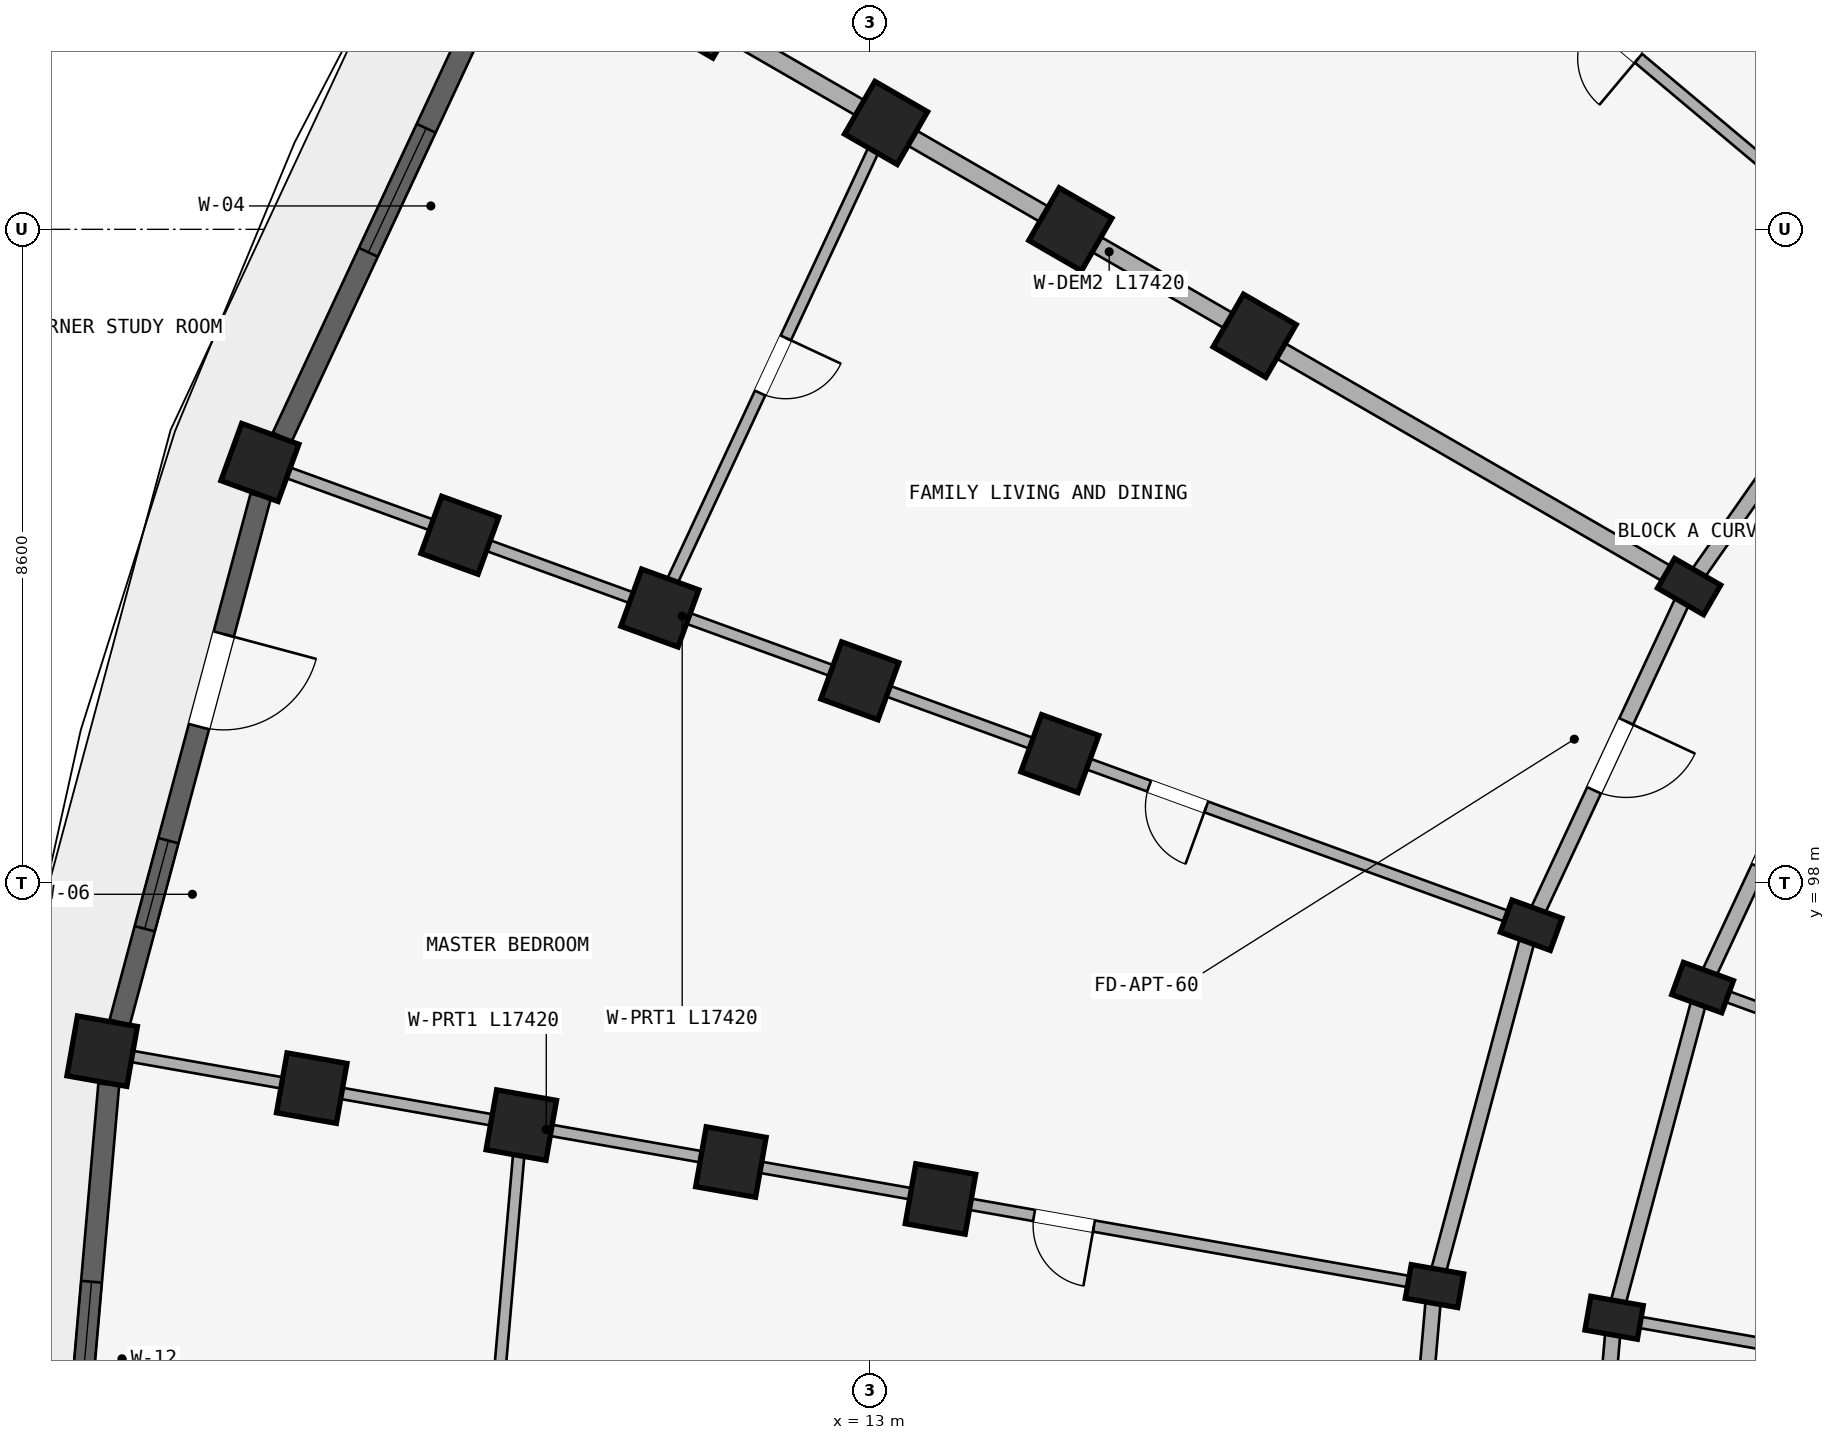
"""IFC4 building model, lengths in metres.
Left out: names, types, materials, properties, quantities, classifications, styles, units other than length and angle.
Written with IfcOpenShell. Run it as: python <this file> out.ifc"""

import sys

from ifc_helpers import new_model, si_unit, direction, frame, frame_2d, origin, origin_2d, place, context, subcontext, project, spatial, rectangle, extrude, element, fill, save


model = new_model("IFC4")
c1 = context("Model", 3, precision=1e-05, world=origin(), true_north=direction((0.0, 1.0)))
c2 = subcontext(c1, "Body", "Model", "MODEL_VIEW")
j1 = project(units=[si_unit("LENGTHUNIT", "METRE"), si_unit("PLANEANGLEUNIT", "RADIAN")], contexts=[c1])
p1 = place(None, origin())
s1 = spatial("IfcSite", under=j1, at=p1, CompositionType="ELEMENT")
p2 = place(p1, origin())
s2 = spatial("IfcBuilding", under=s1, at=p2, CompositionType="ELEMENT")
p3 = place(p2, frame((0.0, 0.0, 11.85)))
s3 = spatial("IfcBuildingStorey", under=s2, at=p3, CompositionType="ELEMENT", Elevation=11.85)
p4 = place(p3, frame((23.778, 101.9, 0.0), z_axis=(0.0, 0.0, 1.0), x_axis=(0.5, 0.866025403784, 0.0)))
e1 = element("IfcColumn", 1, at=p4, inside=s3, PredefinedType="COLUMN", context=c2, shape_type="SweptSolid", body=[
    extrude(rectangle(XDim=0.45, YDim=0.7, at=origin_2d()), origin(), (0.0, 0.0, 1.0), 2.93),
])
for number, where, z_axis, x_axis in (
    (2, (18.062, 105.2, 0.0), (0.0, 0.0, 1.0), (0.5, 0.866, 0.0)),
    (3, (15.637, 106.6, 0.0), (0.0, 0.0, 1.0), (0.5, 0.866, 0.0)),
    (4, (13.213, 108.0, 0.0), (0.0, 0.0, 1.0), (0.5, 0.866, 0.0)),
    (5, (10.788, 109.4, 0.0), (0.0, 0.0, 1.0), (0.5, 0.866, 0.0)),
):
    element("IfcColumn", number, at=place(p3, frame(where, z_axis=z_axis, x_axis=x_axis)), inside=s3, PredefinedType="COLUMN", context=c2, shape_type="SweptSolid", body=[
        extrude(rectangle(XDim=0.8, YDim=0.8, at=origin_2d()), origin(), (0.0, 0.0, 1.0), 2.93),
    ])
for number, where, z_axis, x_axis in (
    (6, (23.956, 96.624, 0.0), (0.0, 0.0, 1.0), (0.342, 0.94, 0.0)),
    (7, (21.701, 97.445, 0.0), (0.0, 0.0, 1.0), (0.342, 0.94, 0.0)),
):
    element("IfcColumn", number, at=place(p3, frame(where, z_axis=z_axis, x_axis=x_axis)), inside=s3, PredefinedType="COLUMN", context=c2, shape_type="SweptSolid", body=[
        extrude(rectangle(XDim=0.45, YDim=0.7, at=origin_2d()), origin(), (0.0, 0.0, 1.0), 2.93),
    ])
for number, where, z_axis, x_axis in (
    (8, (15.499, 99.702, 0.0), (0.0, 0.0, 1.0), (0.342, 0.94, 0.0)),
    (9, (12.868, 100.66, 0.0), (0.0, 0.0, 1.0), (0.342, 0.94, 0.0)),
    (10, (10.236, 101.618, 0.0), (0.0, 0.0, 1.0), (0.342, 0.94, 0.0)),
    (11, (7.605, 102.575, 0.0), (0.0, 0.0, 1.0), (0.342, 0.94, 0.0)),
    (12, (4.974, 103.533, 0.0), (0.0, 0.0, 1.0), (0.342, 0.94, 0.0)),
):
    element("IfcColumn", number, at=place(p3, frame(where, z_axis=z_axis, x_axis=x_axis)), inside=s3, PredefinedType="COLUMN", context=c2, shape_type="SweptSolid", body=[
        extrude(rectangle(XDim=0.8, YDim=0.8, at=origin_2d()), origin(), (0.0, 0.0, 1.0), 2.93),
    ])
for number, where, z_axis, x_axis in (
    (13, (22.792, 92.28, 0.0), (0.0, 0.0, 1.0), (0.174, 0.985, 0.0)),
    (14, (20.428, 92.697, 0.0), (0.0, 0.0, 1.0), (0.174, 0.985, 0.0)),
):
    element("IfcColumn", number, at=place(p3, frame(where, z_axis=z_axis, x_axis=x_axis)), inside=s3, PredefinedType="COLUMN", context=c2, shape_type="SweptSolid", body=[
        extrude(rectangle(XDim=0.45, YDim=0.7, at=origin_2d()), origin(), (0.0, 0.0, 1.0), 2.93),
    ])
for number, where, z_axis, x_axis in (
    (15, (13.929, 93.843, 0.0), (0.0, 0.0, 1.0), (0.174, 0.985, 0.0)),
    (16, (11.171, 94.329, 0.0), (0.0, 0.0, 1.0), (0.174, 0.985, 0.0)),
    (17, (8.414, 94.815, 0.0), (0.0, 0.0, 1.0), (0.174, 0.985, 0.0)),
    (18, (5.656, 95.302, 0.0), (0.0, 0.0, 1.0), (0.174, 0.985, 0.0)),
    (19, (2.899, 95.788, 0.0), (0.0, 0.0, 1.0), (0.174, 0.985, 0.0)),
):
    element("IfcColumn", number, at=place(p3, frame(where, z_axis=z_axis, x_axis=x_axis)), inside=s3, PredefinedType="COLUMN", context=c2, shape_type="SweptSolid", body=[
        extrude(rectangle(XDim=0.8, YDim=0.8, at=origin_2d()), origin(), (0.0, 0.0, 1.0), 2.93),
    ])
p5 = place(p3, frame((26.598, 105.927, 0.0), z_axis=(0.0, 0.0, 1.0), x_axis=(-0.573592335331, -0.819140911474, 0.0)))
e20 = element("IfcWall", 20, at=p5, inside=s3, PredefinedType="STANDARD", context=c2, shape_type="SweptSolid", body=[
    extrude(rectangle(XDim=4.916, YDim=0.2, at=frame_2d((2.458, 0.0))), origin(), (0.0, 0.0, 1.0), 2.372),
])
p6 = place(p3, frame((25.856, 100.7, 0.0), z_axis=(0.0, 0.0, 1.0), x_axis=(-0.422617978463, -0.906307919131, 0.0)))
e21 = element("IfcWall", 21, at=p6, inside=s3, PredefinedType="STANDARD", context=c2, shape_type="SweptSolid", body=[
    extrude(rectangle(XDim=4.497, YDim=0.2, at=frame_2d((2.249, 0.0))), origin(), (0.0, 0.0, 1.0), 2.372),
])
p7 = place(p6, frame((1.749, 0.0, 0.0)))
e22 = element("IfcOpeningElement", 22, at=p7, cuts=e21, PredefinedType="OPENING", context=c2, shape_type="SweptSolid", body=[
    extrude(rectangle(XDim=1.0, YDim=2.15, at=frame_2d((0.5, 1.075))), frame((0.0, 0.11, 0.0), z_axis=(0.0, -1.0, 0.0), x_axis=(1.0, 0.0, 0.0)), (0.0, 0.0, 1.0), 0.22),
])
p8 = place(p3, frame((23.778, 101.9, 0.0), z_axis=(0.0, 0.0, 1.0), x_axis=(-0.422629854778, -0.906302381024, 0.0)))
e23 = element("IfcWall", 23, at=p8, inside=s3, PredefinedType="STANDARD", context=c2, shape_type="SweptSolid", body=[
    extrude(rectangle(XDim=4.915, YDim=0.2, at=frame_2d((2.458, 0.0))), origin(), (0.0, 0.0, 1.0), 2.372),
])
p9 = place(p8, frame((1.958, 0.0, 0.0)))
e24 = element("IfcOpeningElement", 24, at=p9, cuts=e23, PredefinedType="OPENING", context=c2, shape_type="SweptSolid", body=[
    extrude(rectangle(XDim=1.0, YDim=2.15, at=frame_2d((0.5, 1.075))), frame((0.0, 0.11, 0.0), z_axis=(0.0, -1.0, 0.0), x_axis=(1.0, 0.0, 0.0)), (0.0, 0.0, 1.0), 0.22),
])
p10 = place(p3, frame((23.956, 96.624, 0.0), z_axis=(0.0, 0.0, 1.0), x_axis=(-0.258787642463, -0.965934240054, 0.0)))
e25 = element("IfcWall", 25, at=p10, inside=s3, PredefinedType="STANDARD", context=c2, shape_type="SweptSolid", body=[
    extrude(rectangle(XDim=4.497, YDim=0.2, at=frame_2d((2.249, 0.0))), origin(), (0.0, 0.0, 1.0), 2.372),
])
p11 = place(p3, frame((21.701, 97.445, 0.0), z_axis=(0.0, 0.0, 1.0), x_axis=(-0.258803112091, -0.965930095386, 0.0)))
e26 = element("IfcWall", 26, at=p11, inside=s3, PredefinedType="STANDARD", context=c2, shape_type="SweptSolid", body=[
    extrude(rectangle(XDim=4.916, YDim=0.2, at=frame_2d((2.458, 0.0))), origin(), (0.0, 0.0, 1.0), 2.372),
])
p12 = place(p3, frame((22.792, 92.28, 0.0), z_axis=(0.0, 0.0, 1.0), x_axis=(-0.087187153726, -0.996191949488, 0.0)))
e27 = element("IfcWall", 27, at=p12, inside=s3, PredefinedType="STANDARD", context=c2, shape_type="SweptSolid", body=[
    extrude(rectangle(XDim=4.497, YDim=0.2, at=frame_2d((2.249, 0.0))), origin(), (0.0, 0.0, 1.0), 2.372),
])
p13 = place(p3, frame((20.428, 92.697, 0.0), z_axis=(0.0, 0.0, 1.0), x_axis=(-0.087167566415, -0.996193663584, 0.0)))
e28 = element("IfcWall", 28, at=p13, inside=s3, PredefinedType="STANDARD", context=c2, shape_type="SweptSolid", body=[
    extrude(rectangle(XDim=4.916, YDim=0.2, at=frame_2d((2.458, 0.0))), origin(), (0.0, 0.0, 1.0), 2.372),
])
p14 = place(p3, frame((26.521, 105.991, 0.0), z_axis=(0.0, 0.0, 1.0), x_axis=(-0.766046835987, 0.642784757967, 0.0)))
e29 = element("IfcWall", 29, at=p14, inside=s3, PredefinedType="PARTITIONING", context=c2, shape_type="SweptSolid", body=[
    extrude(rectangle(XDim=17.42, YDim=0.15, at=frame_2d((8.71, 0.0))), origin(), (0.0, 0.0, 1.0), 2.372),
])
p15 = place(p14, frame((4.45, 0.0, 0.0)))
e30 = element("IfcOpeningElement", 30, at=p15, cuts=e29, PredefinedType="OPENING", context=c2, shape_type="SweptSolid", body=[
    extrude(rectangle(XDim=0.8, YDim=2.1, at=frame_2d((0.4, 1.05))), frame((0.0, 0.085, 0.0), z_axis=(0.0, -1.0, 0.0), x_axis=(1.0, 0.0, 0.0)), (0.0, 0.0, 1.0), 0.17),
])
p16 = place(p3, frame((23.691, 101.95, 0.0), z_axis=(0.0, 0.0, 1.0), x_axis=(-0.866026648973, 0.499997843263, 0.0)))
e31 = element("IfcWall", 31, at=p16, inside=s3, PredefinedType="STANDARD", context=c2, shape_type="SweptSolid", body=[
    extrude(rectangle(XDim=17.42, YDim=0.23, at=frame_2d((8.71, 0.0))), origin(), (0.0, 0.0, 1.0), 2.372),
])
p17 = place(p3, frame((30.346, 94.298, 0.0), z_axis=(0.0, 0.0, 1.0), x_axis=(-0.939696231917, 0.342010221662, 0.0)))
e32 = element("IfcWall", 32, at=p17, inside=s3, PredefinedType="PARTITIONING", context=c2, shape_type="SweptSolid", body=[
    extrude(rectangle(XDim=6.75, YDim=0.15, at=frame_2d((3.375, 0.0))), origin(), (0.0, 0.0, 1.0), 2.372),
])
p18 = place(p17, frame((3.222, 0.0, 0.0)))
e33 = element("IfcOpeningElement", 33, at=p18, cuts=e32, PredefinedType="OPENING", context=c2, shape_type="SweptSolid", body=[
    extrude(rectangle(XDim=0.98, YDim=2.12, at=frame_2d((0.49, 1.06))), frame((0.0, 0.085, 0.0), z_axis=(0.0, -1.0, 0.0), x_axis=(1.0, 0.0, 0.0)), (0.0, 0.0, 1.0), 0.17),
])
p19 = place(p3, frame((21.607, 97.479, 0.0), z_axis=(0.0, 0.0, 1.0), x_axis=(-0.939691901159, 0.342022120477, 0.0)))
e34 = element("IfcWall", 34, at=p19, inside=s3, PredefinedType="PARTITIONING", context=c2, shape_type="SweptSolid", body=[
    extrude(rectangle(XDim=17.42, YDim=0.15, at=frame_2d((8.71, 0.0))), origin(), (0.0, 0.0, 1.0), 2.372),
])
p20 = place(p19, frame((4.45, 0.0, 0.0)))
e35 = element("IfcOpeningElement", 35, at=p20, cuts=e34, PredefinedType="OPENING", context=c2, shape_type="SweptSolid", body=[
    extrude(rectangle(XDim=0.8, YDim=2.1, at=frame_2d((0.4, 1.05))), frame((0.0, 0.085, 0.0), z_axis=(0.0, -1.0, 0.0), x_axis=(1.0, 0.0, 0.0)), (0.0, 0.0, 1.0), 0.17),
])
p21 = place(p3, frame((29.489, 91.099, 0.0), z_axis=(0.0, 0.0, 1.0), x_axis=(-0.984807944945, 0.173647089161, 0.0)))
e36 = element("IfcWall", 36, at=p21, inside=s3, PredefinedType="PARTITIONING", context=c2, shape_type="SweptSolid", body=[
    extrude(rectangle(XDim=6.75, YDim=0.15, at=frame_2d((3.375, 0.0))), origin(), (0.0, 0.0, 1.0), 2.372),
])
p22 = place(p21, frame((3.262, 0.0, 0.0)))
e37 = element("IfcOpeningElement", 37, at=p22, cuts=e36, PredefinedType="OPENING", context=c2, shape_type="SweptSolid", body=[
    extrude(rectangle(XDim=0.9, YDim=2.1, at=frame_2d((0.45, 1.05))), frame((0.0, 0.085, 0.0), z_axis=(0.0, -1.0, 0.0), x_axis=(1.0, 0.0, 0.0)), (0.0, 0.0, 1.0), 0.17),
])
p23 = place(p3, frame((20.33, 92.714, 0.0), z_axis=(0.0, 0.0, 1.0), x_axis=(-0.984808098809, 0.173646216546, 0.0)))
e38 = element("IfcWall", 38, at=p23, inside=s3, PredefinedType="PARTITIONING", context=c2, shape_type="SweptSolid", body=[
    extrude(rectangle(XDim=17.42, YDim=0.15, at=frame_2d((8.71, 0.0))), origin(), (0.0, 0.0, 1.0), 2.372),
])
p24 = place(p23, frame((4.45, 0.0, 0.0)))
e39 = element("IfcOpeningElement", 39, at=p24, cuts=e38, PredefinedType="OPENING", context=c2, shape_type="SweptSolid", body=[
    extrude(rectangle(XDim=0.8, YDim=2.1, at=frame_2d((0.4, 1.05))), frame((0.0, 0.085, 0.0), z_axis=(0.0, -1.0, 0.0), x_axis=(1.0, 0.0, 0.0)), (0.0, 0.0, 1.0), 0.17),
])
p25 = place(p3, frame((13.213, 108.0, 0.0), z_axis=(0.0, 0.0, 1.0), x_axis=(-0.422640621205, -0.906297360311, 0.0)))
e40 = element("IfcWall", 40, at=p25, inside=s3, PredefinedType="PLUMBINGWALL", context=c2, shape_type="SweptSolid", body=[
    extrude(rectangle(XDim=7.042, YDim=0.15, at=frame_2d((3.521, 0.0))), origin(), (0.0, 0.0, 1.0), 2.372),
])
p26 = place(p25, frame((3.121, 0.0, 0.0)))
e41 = element("IfcOpeningElement", 41, at=p26, cuts=e40, PredefinedType="OPENING", context=c2, shape_type="SweptSolid", body=[
    extrude(rectangle(XDim=0.8, YDim=2.1, at=frame_2d((0.4, 1.05))), frame((0.0, 0.085, 0.0), z_axis=(0.0, -1.0, 0.0), x_axis=(1.0, 0.0, 0.0)), (0.0, 0.0, 1.0), 0.17),
])
p27 = place(p3, frame((8.414, 94.815, 0.0), z_axis=(0.0, 0.0, 1.0), x_axis=(-0.087156198737, -0.996194658198, 0.0)))
e42 = element("IfcWall", 42, at=p27, inside=s3, PredefinedType="PLUMBINGWALL", context=c2, shape_type="SweptSolid", body=[
    extrude(rectangle(XDim=7.042, YDim=0.15, at=frame_2d((3.521, 0.0))), origin(), (0.0, 0.0, 1.0), 2.372),
])
p28 = place(p27, frame((3.141, 0.0, 0.0)))
e43 = element("IfcOpeningElement", 43, at=p28, cuts=e42, PredefinedType="OPENING", context=c2, shape_type="SweptSolid", body=[
    extrude(rectangle(XDim=0.76, YDim=2.05, at=frame_2d((0.38, 1.025))), frame((0.0, 0.085, 0.0), z_axis=(0.0, -1.0, 0.0), x_axis=(1.0, 0.0, 0.0)), (0.0, 0.0, 1.0), 0.17),
])
p29 = place(p3, frame((8.296, 110.36, 0.0), z_axis=(0.0, 0.0, 1.0), x_axis=(-0.422633596215, -0.906300636296, 0.0)))
e44 = element("IfcWall", 44, at=p29, inside=s3, PredefinedType="STANDARD", context=c2, shape_type="SweptSolid", body=[
    extrude(rectangle(XDim=7.164, YDim=0.275, at=frame_2d((3.582, 0.0))), origin(), (0.0, 0.0, 1.0), 2.372),
])
p30 = place(p29, frame((2.682, 0.0, 0.522)))
e45 = element("IfcOpeningElement", 45, at=p30, cuts=e44, PredefinedType="OPENING", context=c2, shape_type="SweptSolid", body=[
    extrude(rectangle(XDim=1.8, YDim=1.65, at=frame_2d((0.9, 0.825))), frame((0.0, 0.147, 0.0), z_axis=(0.0, -1.0, 0.0), x_axis=(1.0, 0.0, 0.0)), (0.0, 0.0, 1.0), 0.295),
])
p31 = place(p3, frame((4.984, 103.088, 0.0), z_axis=(0.0, 0.0, 1.0), x_axis=(-0.258826933296, -0.965923712619, 0.0)))
e46 = element("IfcWall", 46, at=p31, inside=s3, PredefinedType="STANDARD", context=c2, shape_type="SweptSolid", body=[
    extrude(rectangle(XDim=7.164, YDim=0.275, at=frame_2d((3.582, 0.0))), origin(), (0.0, 0.0, 1.0), 2.372),
])
p32 = place(p31, frame((4.69, 0.0, 0.372)))
e47 = element("IfcOpeningElement", 47, at=p32, cuts=e46, PredefinedType="OPENING", context=c2, shape_type="SweptSolid", body=[
    extrude(rectangle(XDim=1.2, YDim=1.5, at=frame_2d((0.6, 0.75))), frame((0.0, 0.147, 0.0), z_axis=(0.0, -1.0, 0.0), x_axis=(1.0, 0.0, 0.0)), (0.0, 0.0, 1.0), 0.295),
])
p33 = place(p31, frame((1.877, 0.0, 0.0)))
e48 = element("IfcOpeningElement", 48, at=p33, cuts=e46, PredefinedType="OPENING", context=c2, shape_type="SweptSolid", body=[
    extrude(rectangle(XDim=1.26, YDim=2.15, at=frame_2d((0.63, 1.075))), frame((0.0, 0.147, 0.0), z_axis=(0.0, -1.0, 0.0), x_axis=(1.0, 0.0, 0.0)), (0.0, 0.0, 1.0), 0.295),
])
p34 = place(p3, frame((2.986, 95.351, 0.0), z_axis=(0.0, 0.0, 1.0), x_axis=(-0.08713989423, -0.99619608453, 0.0)))
e49 = element("IfcWall", 49, at=p34, inside=s3, PredefinedType="STANDARD", context=c2, shape_type="SweptSolid", body=[
    extrude(rectangle(XDim=7.164, YDim=0.275, at=frame_2d((3.582, 0.0))), origin(), (0.0, 0.0, 1.0), 2.372),
])
p35 = place(p34, frame((2.607, 0.0, 0.322)))
e50 = element("IfcOpeningElement", 50, at=p35, cuts=e49, PredefinedType="OPENING", context=c2, shape_type="SweptSolid", body=[
    extrude(rectangle(XDim=1.95, YDim=1.85, at=frame_2d((0.975, 0.925))), frame((0.0, 0.147, 0.0), z_axis=(0.0, -1.0, 0.0), x_axis=(1.0, 0.0, 0.0)), (0.0, 0.0, 1.0), 0.295),
])
p36 = place(p30, origin())
e51 = element("IfcWindow", 51, at=p36, inside=s3, PartitioningType="DOUBLE_PANEL_VERTICAL", PredefinedType="WINDOW", context=c2, shape_type="SweptSolid", body=[
    extrude(rectangle(XDim=1.8, YDim=1.65, at=frame_2d((0.9, 0.825))), frame((0.0, 0.03, 0.0), z_axis=(0.0, -1.0, 0.0), x_axis=(1.0, 0.0, 0.0)), (0.0, 0.0, 1.0), 0.06),
])
fill(e45, e51)
p37 = place(p32, origin())
e52 = element("IfcWindow", 52, at=p37, inside=s3, PartitioningType="SINGLE_PANEL", PredefinedType="WINDOW", context=c2, shape_type="SweptSolid", body=[
    extrude(rectangle(XDim=1.2, YDim=1.5, at=frame_2d((0.6, 0.75))), frame((0.0, 0.03, 0.0), z_axis=(0.0, -1.0, 0.0), x_axis=(1.0, 0.0, 0.0)), (0.0, 0.0, 1.0), 0.06),
])
fill(e47, e52)
p38 = place(p35, origin())
e53 = element("IfcWindow", 53, at=p38, inside=s3, PartitioningType="DOUBLE_PANEL_VERTICAL", PredefinedType="WINDOW", context=c2, shape_type="SweptSolid", body=[
    extrude(rectangle(XDim=1.95, YDim=1.85, at=frame_2d((0.975, 0.925))), frame((0.0, 0.03, 0.0), z_axis=(0.0, -1.0, 0.0), x_axis=(1.0, 0.0, 0.0)), (0.0, 0.0, 1.0), 0.06),
])
fill(e50, e53)
p39 = place(p15, frame((0.8, 0.0, 0.0), z_axis=(0.0, 0.0, 1.0), x_axis=(-1.0, 0.0, 0.0)))
e54 = element("IfcDoor", 54, at=p39, inside=s3, OperationType="SINGLE_SWING_RIGHT", PredefinedType="DOOR", context=c2, shape_type="SweptSolid", body=[
    extrude(rectangle(XDim=0.8, YDim=2.1, at=frame_2d((0.4, 1.05))), frame((0.0, 0.025, 0.0), z_axis=(0.0, -1.0, 0.0), x_axis=(1.0, 0.0, 0.0)), (0.0, 0.0, 1.0), 0.05),
])
fill(e30, e54)
p40 = place(p20, frame((0.8, 0.0, 0.0), z_axis=(0.0, 0.0, 1.0), x_axis=(-1.0, 0.0, 0.0)))
e55 = element("IfcDoor", 55, at=p40, inside=s3, OperationType="SINGLE_SWING_RIGHT", PredefinedType="DOOR", context=c2, shape_type="SweptSolid", body=[
    extrude(rectangle(XDim=0.8, YDim=2.1, at=frame_2d((0.4, 1.05))), frame((0.0, 0.025, 0.0), z_axis=(0.0, -1.0, 0.0), x_axis=(1.0, 0.0, 0.0)), (0.0, 0.0, 1.0), 0.05),
])
fill(e35, e55)
p41 = place(p24, frame((0.8, 0.0, 0.0), z_axis=(0.0, 0.0, 1.0), x_axis=(-1.0, 0.0, 0.0)))
e56 = element("IfcDoor", 56, at=p41, inside=s3, OperationType="SINGLE_SWING_RIGHT", PredefinedType="DOOR", context=c2, shape_type="SweptSolid", body=[
    extrude(rectangle(XDim=0.8, YDim=2.1, at=frame_2d((0.4, 1.05))), frame((0.0, 0.025, 0.0), z_axis=(0.0, -1.0, 0.0), x_axis=(1.0, 0.0, 0.0)), (0.0, 0.0, 1.0), 0.05),
])
fill(e39, e56)
p42 = place(p9, origin())
e57 = element("IfcDoor", 57, at=p42, inside=s3, OperationType="SINGLE_SWING_LEFT", PredefinedType="DOOR", context=c2, shape_type="SweptSolid", body=[
    extrude(rectangle(XDim=1.0, YDim=2.15, at=frame_2d((0.5, 1.075))), frame((0.0, 0.025, 0.0), z_axis=(0.0, -1.0, 0.0), x_axis=(1.0, 0.0, 0.0)), (0.0, 0.0, 1.0), 0.05),
])
fill(e24, e57)
p43 = place(p26, frame((0.8, 0.0, 0.0), z_axis=(0.0, 0.0, 1.0), x_axis=(-1.0, 0.0, 0.0)))
e58 = element("IfcDoor", 58, at=p43, inside=s3, OperationType="SINGLE_SWING_RIGHT", PredefinedType="DOOR", context=c2, shape_type="SweptSolid", body=[
    extrude(rectangle(XDim=0.8, YDim=2.1, at=frame_2d((0.4, 1.05))), frame((0.0, 0.025, 0.0), z_axis=(0.0, -1.0, 0.0), x_axis=(1.0, 0.0, 0.0)), (0.0, 0.0, 1.0), 0.05),
])
fill(e41, e58)
p44 = place(p33, frame((1.26, 0.0, 0.0), z_axis=(0.0, 0.0, 1.0), x_axis=(-1.0, 0.0, 0.0)))
e59 = element("IfcDoor", 59, at=p44, inside=s3, OperationType="SINGLE_SWING_RIGHT", PredefinedType="DOOR", context=c2, shape_type="SweptSolid", body=[
    extrude(rectangle(XDim=1.26, YDim=2.15, at=frame_2d((0.63, 1.075))), frame((0.0, 0.025, 0.0), z_axis=(0.0, -1.0, 0.0), x_axis=(1.0, 0.0, 0.0)), (0.0, 0.0, 1.0), 0.05),
])
fill(e48, e59)
save(model, sys.argv[1])
